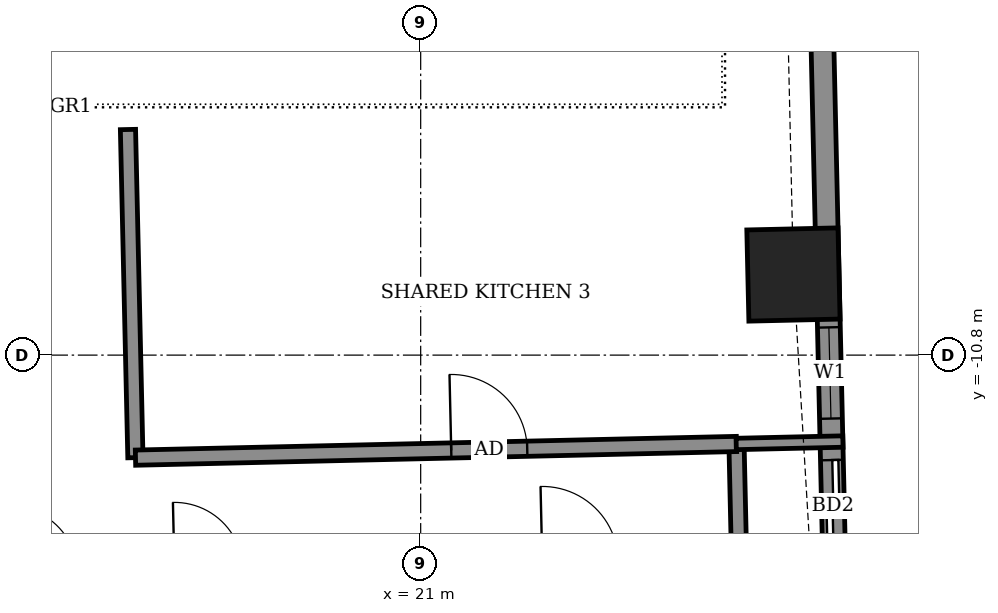
"""IFC4 building model, lengths in metres.
Left out: names, types, materials, properties, quantities, classifications, styles, units other than length and angle.
Written with IfcOpenShell. Run it as: python <this file> out.ifc"""

import sys

from ifc_helpers import new_model, si_unit, direction, frame, frame_2d, origin, origin_2d, place, context, subcontext, project, spatial, rectangle, extrude, element, fill, save


model = new_model("IFC4")
c1 = context("Model", 3, precision=1e-05, world=origin(), true_north=direction((0.0, 1.0)))
c2 = subcontext(c1, "Body", "Model", "MODEL_VIEW")
j1 = project(units=[si_unit("LENGTHUNIT", "METRE"), si_unit("PLANEANGLEUNIT", "RADIAN")], contexts=[c1])
p1 = place(None, origin())
s1 = spatial("IfcSite", under=j1, at=p1, CompositionType="ELEMENT")
p2 = place(p1, origin())
s2 = spatial("IfcBuilding", under=s1, at=p2, CompositionType="ELEMENT")
p3 = place(p2, frame((0.0, 0.0, 189.7)))
s3 = spatial("IfcBuildingStorey", under=s2, at=p3, CompositionType="ELEMENT", Elevation=189.7)
p4 = place(p3, frame((25.904, -9.74, -0.55), z_axis=(0.0, 0.0, 1.0), x_axis=(-0.022618201372, 0.99974417576, 0.0)))
e1 = element("IfcColumn", 1, at=p4, inside=s3, PredefinedType="COLUMN", context=c2, shape_type="SweptSolid", body=[
    extrude(rectangle(XDim=1.2, YDim=1.2, at=origin_2d()), origin(), (0.0, 0.0, 1.0), 3.6),
])
p5 = place(p3, frame((26.466, -14.64, 0.0), z_axis=(0.0, 0.0, 1.0), x_axis=(-0.022735782058, 0.999741508698, 0.0)))
e2 = element("IfcWall", 2, at=p5, inside=s3, PredefinedType="SOLIDWALL", context=c2, shape_type="SweptSolid", body=[
    extrude(rectangle(XDim=10.03, YDim=0.3, at=frame_2d((5.015, 0.0))), origin(), (0.0, 0.0, 1.0), 2.55),
])
p6 = place(p5, frame((1.26, 0.0, 0.0)))
e3 = element("IfcOpeningElement", 3, at=p6, cuts=e2, PredefinedType="OPENING", context=c2, shape_type="SweptSolid", body=[
    extrude(rectangle(XDim=1.2, YDim=2.4, at=frame_2d((0.6, 1.2))), frame((0.0, 0.16, 0.0), z_axis=(0.0, -1.0, 0.0), x_axis=(1.0, 0.0, 0.0)), (0.0, 0.0, 1.0), 0.32),
])
p7 = place(p5, frame((3.006, 0.0, 0.9)))
e4 = element("IfcOpeningElement", 4, at=p7, cuts=e2, PredefinedType="OPENING", context=c2, shape_type="SweptSolid", body=[
    extrude(rectangle(XDim=1.2, YDim=1.5, at=frame_2d((0.6, 0.75))), frame((0.0, 0.16, 0.0), z_axis=(0.0, -1.0, 0.0), x_axis=(1.0, 0.0, 0.0)), (0.0, 0.0, 1.0), 0.32),
])
p8 = place(p3, frame((25.189, -13.469, 0.0), z_axis=(0.0, 0.0, 1.0), x_axis=(-0.022617910375, 0.999744182344, 0.0)))
e5 = element("IfcWall", 5, at=p8, inside=s3, PredefinedType="PARTITIONING", context=c2, shape_type="SweptSolid", body=[
    extrude(rectangle(XDim=1.5, YDim=0.2, at=frame_2d((0.75, 0.0))), origin(), (0.0, 0.0, 1.0), 3.05),
])
p9 = place(p3, frame((17.247, -12.149, 0.0), z_axis=(0.0, 0.0, 1.0), x_axis=(-0.022729111383, 0.999741660378, 0.0)))
e6 = element("IfcWall", 6, at=p9, inside=s3, PredefinedType="PARTITIONING", context=c2, shape_type="SweptSolid", body=[
    extrude(rectangle(XDim=4.318, YDim=0.2, at=frame_2d((2.159, 0.0))), origin(), (0.0, 0.0, 1.0), 3.05),
])
p10 = place(p3, frame((17.248, -12.149, 0.0), z_axis=(0.0, 0.0, 1.0), x_axis=(0.999741181744, 0.022750154412, 0.0)))
e7 = element("IfcWall", 7, at=p10, inside=s3, PredefinedType="PARTITIONING", context=c2, shape_type="SweptSolid", body=[
    extrude(rectangle(XDim=7.909, YDim=0.2, at=frame_2d((3.955, 0.0))), origin(), (0.0, 0.0, 1.0), 3.05),
])
p11 = place(p10, frame((4.155, 0.0, 0.0)))
e8 = element("IfcOpeningElement", 8, at=p11, cuts=e7, PredefinedType="OPENING", context=c2, shape_type="SweptSolid", body=[
    extrude(rectangle(XDim=1.0, YDim=2.1, at=frame_2d((0.5, 1.05))), frame((0.0, 0.11, 0.0), z_axis=(0.0, -1.0, 0.0), x_axis=(1.0, 0.0, 0.0)), (0.0, 0.0, 1.0), 0.22),
])
p12 = place(p3, frame((25.151, -11.969, 0.0), z_axis=(0.0, 0.0, 1.0), x_axis=(0.999740667531, 0.022772739949, 0.0)))
e9 = element("IfcWall", 9, at=p12, inside=s3, PredefinedType="PARTITIONING", context=c2, shape_type="SweptSolid", body=[
    extrude(rectangle(XDim=1.404, YDim=0.15, at=frame_2d((0.702, 0.0))), origin(), (0.0, 0.0, 1.0), 2.55),
])
p13 = place(p6, origin())
e10 = element("IfcDoor", 10, at=p13, inside=s3, OperationType="SLIDING_TO_LEFT", PredefinedType="DOOR", context=c2, shape_type="SweptSolid", body=[
    extrude(rectangle(XDim=1.2, YDim=2.4, at=frame_2d((0.6, 1.2))), frame((0.0, 0.025, 0.0), z_axis=(0.0, -1.0, 0.0), x_axis=(1.0, 0.0, 0.0)), (0.0, 0.0, 1.0), 0.05),
])
fill(e3, e10)
p14 = place(p7, origin())
e11 = element("IfcWindow", 11, at=p14, inside=s3, PartitioningType="SINGLE_PANEL", PredefinedType="WINDOW", context=c2, shape_type="SweptSolid", body=[
    extrude(rectangle(XDim=1.2, YDim=1.5, at=frame_2d((0.6, 0.75))), frame((0.0, 0.03, 0.0), z_axis=(0.0, -1.0, 0.0), x_axis=(1.0, 0.0, 0.0)), (0.0, 0.0, 1.0), 0.06),
])
fill(e4, e11)
p15 = place(p11, origin())
e12 = element("IfcDoor", 12, at=p15, inside=s3, OperationType="SINGLE_SWING_LEFT", PredefinedType="DOOR", context=c2, shape_type="SweptSolid", body=[
    extrude(rectangle(XDim=1.0, YDim=2.1, at=frame_2d((0.5, 1.05))), frame((0.0, 0.025, 0.0), z_axis=(0.0, -1.0, 0.0), x_axis=(1.0, 0.0, 0.0)), (0.0, 0.0, 1.0), 0.05),
])
fill(e8, e12)
save(model, sys.argv[1])
